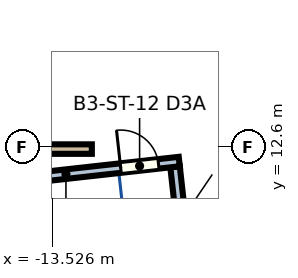
"""IFC4 building model, lengths in metres.
Left out: names, types, materials, properties, quantities, classifications, styles, units other than length and angle.
Written with IfcOpenShell. Run it as: python <this file> out.ifc"""

import sys

from ifc_helpers import new_model, si_unit, direction, frame, frame_2d, origin, place, context, subcontext, project, spatial, rectangle, extrude, element, fill, save


model = new_model("IFC4")
c1 = context("Model", 3, precision=1e-05, world=origin(), true_north=direction((0.0, 1.0)))
c2 = subcontext(c1, "Body", "Model", "MODEL_VIEW")
j1 = project(units=[si_unit("LENGTHUNIT", "METRE"), si_unit("PLANEANGLEUNIT", "RADIAN")], contexts=[c1])
p1 = place(None, origin())
s1 = spatial("IfcSite", under=j1, at=p1, CompositionType="ELEMENT")
p2 = place(p1, origin())
s2 = spatial("IfcBuilding", under=s1, at=p2, CompositionType="ELEMENT")
p3 = place(p2, frame((0.0, 0.0, -13.0)))
s3 = spatial("IfcBuildingStorey", under=s2, at=p3, CompositionType="ELEMENT", Elevation=-13.0)
p4 = place(p3, frame((-16.05, 12.6, 0.0), z_axis=(0.0, 0.0, 1.0), x_axis=(1.0, 0.0, 0.0)))
e1 = element("IfcWall", 1, at=p4, inside=s3, PredefinedType="PARTITIONING", context=c2, shape_type="SweptSolid", body=[
    extrude(rectangle(XDim=3.561, YDim=0.25, at=frame_2d((1.78, 0.0))), origin(), (0.0, 0.0, 1.0), 3.7),
])
p5 = place(p3, frame((-10.3, 12.134, 0.0), z_axis=(0.0, 0.0, 1.0), x_axis=(0.110328108544, -0.993895220063, 0.0)))
e2 = element("IfcWall", 2, at=p5, inside=s3, PredefinedType="SOLIDWALL", context=c2, shape_type="SweptSolid", body=[
    extrude(rectangle(XDim=2.85, YDim=0.25, at=frame_2d((1.425, 0.0))), origin(), (0.0, 0.0, 1.0), 3.7),
])
p6 = place(p3, frame((-16.153, 11.61, 0.0), z_axis=(0.0, 0.0, 1.0), x_axis=(0.993897125329, 0.110310943534, 0.0)))
e3 = element("IfcWall", 3, at=p6, inside=s3, PredefinedType="SOLIDWALL", context=c2, shape_type="SweptSolid", body=[
    extrude(rectangle(XDim=6.0, YDim=0.25, at=frame_2d((3.0, 0.0))), origin(), (0.0, 0.0, 1.0), 3.7),
])
p7 = place(p6, frame((4.45, 0.0, 0.0)))
e4 = element("IfcOpeningElement", 4, at=p7, cuts=e3, PredefinedType="OPENING", context=c2, shape_type="SweptSolid", body=[
    extrude(rectangle(XDim=1.0, YDim=2.1, at=frame_2d((0.5, 1.05))), frame((0.0, 0.135, 0.0), z_axis=(0.0, -1.0, 0.0), x_axis=(1.0, 0.0, 0.0)), (0.0, 0.0, 1.0), 0.27),
])
p8 = place(p7, origin())
e5 = element("IfcDoor", 5, at=p8, inside=s3, PredefinedType="DOOR", context=c2, shape_type="SweptSolid", body=[
    extrude(rectangle(XDim=1.0, YDim=2.1, at=frame_2d((0.5, 1.05))), frame((0.0, 0.025, 0.0), z_axis=(0.0, -1.0, 0.0), x_axis=(1.0, 0.0, 0.0)), (0.0, 0.0, 1.0), 0.05),
])
fill(e4, e5)
save(model, sys.argv[1])
